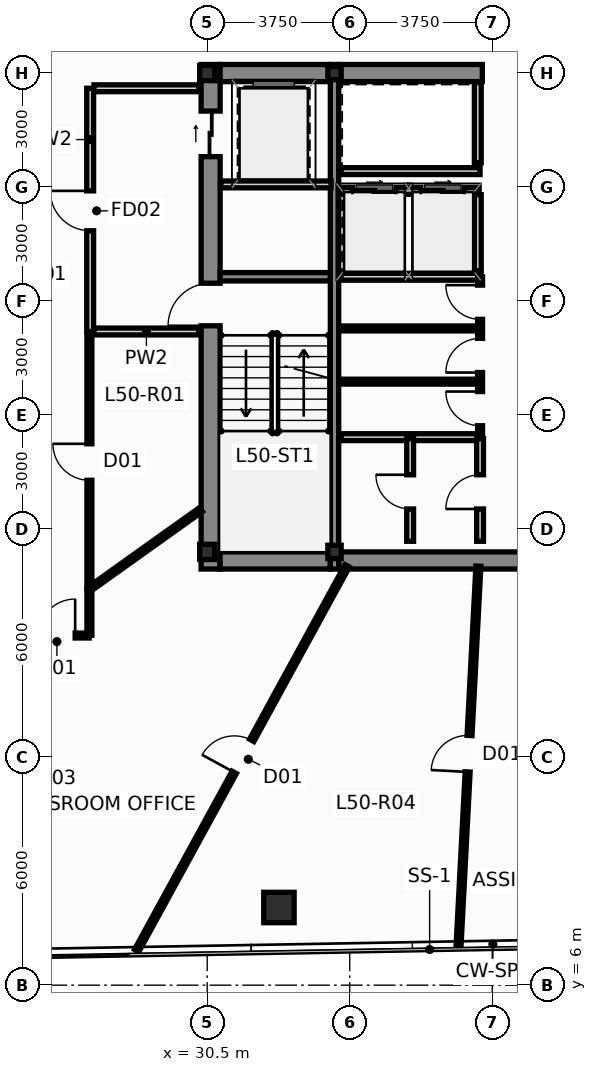
"""IFC4 building model, lengths in metres.
Left out: names, types, materials, properties, quantities, classifications, styles, units other than length and angle.
Written with IfcOpenShell. Run it as: python <this file> out.ifc"""

import sys

from ifc_helpers import new_model, si_unit, direction, frame, frame_2d, origin, origin_2d, place, context, subcontext, project, spatial, rectangle, hollow_rectangle, i_section, extrude, source, transform, mapped, element, fill, save


model = new_model("IFC4")
c1 = context("Model", 3, precision=1e-05, world=origin(), true_north=direction((0.0, 1.0)))
c2 = subcontext(c1, "Body", "Model", "MODEL_VIEW")
j1 = project(units=[si_unit("LENGTHUNIT", "METRE"), si_unit("PLANEANGLEUNIT", "RADIAN")], contexts=[c1])
p1 = place(None, origin())
s1 = spatial("IfcSite", under=j1, at=p1, CompositionType="ELEMENT")
p2 = place(p1, origin())
s2 = spatial("IfcBuilding", under=s1, at=p2, CompositionType="ELEMENT")
p3 = place(p2, frame((0.0, 0.0, 191.35)))
s3 = spatial("IfcBuildingStorey", under=s2, at=p3, CompositionType="ELEMENT", Elevation=191.35)
m1 = source(origin(), c2, "Body", "SweptSolid", [
    extrude(i_section(OverallWidth=0.4, OverallDepth=0.4, WebThickness=0.02, FlangeThickness=0.032, at=origin_2d()), origin(), (0.0, 0.0, 1.0), 3.65),
])
for number, where, z_axis, x_axis in (
    (1, (30.5, 17.4, 0.0), (0.0, 0.0, 1.0), (1.0, 0.0, 0.0)),
    (2, (30.5, 30.0, 0.0), (0.0, 0.0, 1.0), (1.0, 0.0, 0.0)),
):
    element("IfcColumn", number, at=place(p3, frame(where, z_axis=z_axis, x_axis=x_axis)), inside=s3, PredefinedType="COLUMN", context=c2, shape_type="MappedRepresentation", body=[
        mapped(m1, transform((0.0, 0.0, 0.0), scale=1.0)),
    ])
m2 = source(origin(), c2, "Body", "SweptSolid", [
    extrude(hollow_rectangle(XDim=0.35, YDim=0.35, WallThickness=0.016, at=origin_2d()), origin(), (0.0, 0.0, 1.0), 3.65),
])
for number, where, z_axis, x_axis in (
    (3, (33.85, 17.4, 0.0), (0.0, 0.0, 1.0), (1.0, 0.0, 0.0)),
    (4, (33.85, 30.0, 0.0), (0.0, 0.0, 1.0), (1.0, 0.0, 0.0)),
):
    element("IfcColumn", number, at=place(p3, frame(where, z_axis=z_axis, x_axis=x_axis)), inside=s3, PredefinedType="COLUMN", context=c2, shape_type="MappedRepresentation", body=[
        mapped(m2, transform((0.0, 0.0, 0.0), scale=1.0)),
    ])
p4 = place(p3, frame((30.59, 16.95, 0.0), z_axis=(0.0, 0.0, 1.0), x_axis=(0.0, 1.0, 0.0)))
e5 = element("IfcWall", 5, at=p4, inside=s3, PredefinedType="SHEAR", context=c2, shape_type="SweptSolid", body=[
    extrude(rectangle(XDim=13.275, YDim=0.5, at=frame_2d((6.638, 0.0))), origin(), (0.0, 0.0, 1.0), 3.65),
])
p5 = place(p4, frame((6.4, 0.0, 0.0)))
e6 = element("IfcOpeningElement", 6, at=p5, cuts=e5, PredefinedType="OPENING", context=c2, shape_type="SweptSolid", body=[
    extrude(rectangle(XDim=1.12, YDim=2.15, at=frame_2d((0.56, 1.075))), frame((0.0, 0.262, 0.0), z_axis=(0.0, -1.0, 0.0), x_axis=(1.0, 0.0, 0.0)), (0.0, 0.0, 1.0), 0.524),
])
p6 = place(p4, frame((10.85, 0.0, 0.0)))
e7 = element("IfcOpeningElement", 7, at=p6, cuts=e5, PredefinedType="OPENING", context=c2, shape_type="SweptSolid", body=[
    extrude(rectangle(XDim=1.2, YDim=2.2, at=frame_2d((0.6, 1.1))), frame((0.0, 0.262, 0.0), z_axis=(0.0, -1.0, 0.0), x_axis=(1.0, 0.0, 0.0)), (0.0, 0.0, 1.0), 0.524),
])
p7 = place(p3, frame((30.84, 17.175, 0.0), z_axis=(0.0, 0.0, 1.0), x_axis=(1.0, 0.0, 0.0)))
e8 = element("IfcWall", 8, at=p7, inside=s3, PredefinedType="SHEAR", context=c2, shape_type="SweptSolid", body=[
    extrude(rectangle(XDim=2.9, YDim=0.45, at=frame_2d((1.45, 0.0))), origin(), (0.0, 0.0, 1.0), 3.65),
])
p8 = place(p3, frame((33.96, 17.175, 0.0), z_axis=(0.0, 0.0, 1.0), x_axis=(1.0, 0.0, 0.0)))
e9 = element("IfcWall", 9, at=p8, inside=s3, PredefinedType="SHEAR", context=c2, shape_type="SweptSolid", body=[
    extrude(rectangle(XDim=8.08, YDim=0.45, at=frame_2d((4.04, 0.0))), origin(), (0.0, 0.0, 1.0), 3.65),
])
p9 = place(p3, frame((30.84, 30.0, 0.0), z_axis=(0.0, 0.0, 1.0), x_axis=(1.0, 0.0, 0.0)))
e10 = element("IfcWall", 10, at=p9, inside=s3, PredefinedType="SHEAR", context=c2, shape_type="SweptSolid", body=[
    extrude(rectangle(XDim=2.9, YDim=0.45, at=frame_2d((1.45, 0.0))), origin(), (0.0, 0.0, 1.0), 3.65),
])
p10 = place(p3, frame((33.96, 30.0, 0.0), z_axis=(0.0, 0.0, 1.0), x_axis=(1.0, 0.0, 0.0)))
e11 = element("IfcWall", 11, at=p10, inside=s3, PredefinedType="SHEAR", context=c2, shape_type="SweptSolid", body=[
    extrude(rectangle(XDim=3.78, YDim=0.45, at=frame_2d((1.89, 0.0))), origin(), (0.0, 0.0, 1.0), 3.65),
])
p11 = place(p3, frame((33.85, 16.95, 0.0), z_axis=(0.0, 0.0, 1.0), x_axis=(0.0, 1.0, 0.0)))
e12 = element("IfcWall", 12, at=p11, inside=s3, PredefinedType="SHEAR", context=c2, shape_type="SweptSolid", body=[
    extrude(rectangle(XDim=13.275, YDim=0.22, at=frame_2d((6.638, 0.0))), origin(), (0.0, 0.0, 1.0), 3.65),
])
p12 = place(p3, frame((30.84, 24.64, 0.0), z_axis=(0.0, 0.0, 1.0), x_axis=(1.0, 0.0, 0.0)))
e13 = element("IfcWall", 13, at=p12, inside=s3, PredefinedType="SHEAR", context=c2, shape_type="SweptSolid", body=[
    extrude(rectangle(XDim=2.9, YDim=0.22, at=frame_2d((1.45, 0.0))), origin(), (0.0, 0.0, 1.0), 3.65),
])
m3 = source(origin(), c2, "Body", "SweptSolid", [
    extrude(hollow_rectangle(XDim=0.8, YDim=0.8, WallThickness=0.045, at=origin_2d()), origin(), (0.0, 0.0, 1.0), 3.651),
])
p13 = place(p3, frame((32.387, 8.043, 0.0), z_axis=(-0.004480682206, 0.019795252729, 0.999794014513), x_axis=(-0.975326687046, -0.220766513622, 0.0)))
e14 = element("IfcColumn", 14, at=p13, inside=s3, PredefinedType="COLUMN", context=c2, shape_type="MappedRepresentation", body=[
    mapped(m3, transform((0.0, 0.0, 0.0), scale=1.0)),
])
p14 = place(p3, frame((34.02, 26.9, 0.0), z_axis=(0.0, 0.0, 1.0), x_axis=(1.0, 0.0, 0.0)))
e15 = element("IfcWall", 15, at=p14, inside=s3, PredefinedType="PARTITIONING", context=c2, shape_type="SweptSolid", body=[
    extrude(rectangle(XDim=3.6, YDim=0.18, at=frame_2d((1.8, 0.0))), origin(), (0.0, 0.0, 1.0), 3.4),
])
p15 = place(p14, frame((0.3, 0.0, 0.0)))
e16 = element("IfcOpeningElement", 16, at=p15, cuts=e15, PredefinedType="OPENING", context=c2, shape_type="SweptSolid", body=[
    extrude(rectangle(XDim=1.15, YDim=2.2, at=frame_2d((0.575, 1.1))), frame((0.0, 0.102, 0.0), z_axis=(0.0, -1.0, 0.0), x_axis=(1.0, 0.0, 0.0)), (0.0, 0.0, 1.0), 0.204),
])
p16 = place(p14, frame((2.1, 0.0, 0.0)))
e17 = element("IfcOpeningElement", 17, at=p16, cuts=e15, PredefinedType="OPENING", context=c2, shape_type="SweptSolid", body=[
    extrude(rectangle(XDim=1.15, YDim=2.2, at=frame_2d((0.575, 1.1))), frame((0.0, 0.102, 0.0), z_axis=(0.0, -1.0, 0.0), x_axis=(1.0, 0.0, 0.0)), (0.0, 0.0, 1.0), 0.204),
])
p17 = place(p3, frame((37.62, 24.8, 0.0), z_axis=(0.0, 0.0, 1.0), x_axis=(0.0, 1.0, 0.0)))
e18 = element("IfcWall", 18, at=p17, inside=s3, PredefinedType="PARTITIONING", context=c2, shape_type="SweptSolid", body=[
    extrude(rectangle(XDim=2.0, YDim=0.18, at=frame_2d((1.0, 0.0))), origin(), (0.0, 0.0, 1.0), 3.4),
])
p18 = place(p3, frame((34.02, 24.64, 0.0), z_axis=(0.0, 0.0, 1.0), x_axis=(1.0, 0.0, 0.0)))
e19 = element("IfcWall", 19, at=p18, inside=s3, PredefinedType="PARTITIONING", context=c2, shape_type="SweptSolid", body=[
    extrude(rectangle(XDim=3.68, YDim=0.18, at=frame_2d((1.84, 0.0))), origin(), (0.0, 0.0, 1.0), 3.4),
])
p19 = place(p3, frame((34.02, 27.42, 0.0), z_axis=(0.0, 0.0, 1.0), x_axis=(1.0, 0.0, 0.0)))
e20 = element("IfcWall", 20, at=p19, inside=s3, PredefinedType="PARTITIONING", context=c2, shape_type="SweptSolid", body=[
    extrude(rectangle(XDim=3.66, YDim=0.18, at=frame_2d((1.83, 0.0))), origin(), (0.0, 0.0, 1.0), 3.4),
])
p20 = place(p3, frame((37.62, 27.64, 0.0), z_axis=(0.0, 0.0, 1.0), x_axis=(0.0, 1.0, 0.0)))
e21 = element("IfcWall", 21, at=p20, inside=s3, PredefinedType="PARTITIONING", context=c2, shape_type="SweptSolid", body=[
    extrude(rectangle(XDim=2.11, YDim=0.18, at=frame_2d((1.055, 0.0))), origin(), (0.0, 0.0, 1.0), 3.4),
])
p21 = place(p3, frame((27.42, 23.2, 0.0), z_axis=(0.0, 0.0, 1.0), x_axis=(0.0, 1.0, 0.0)))
e22 = element("IfcWall", 22, at=p21, inside=s3, PredefinedType="PARTITIONING", context=c2, shape_type="SweptSolid", body=[
    extrude(rectangle(XDim=6.4, YDim=0.18, at=frame_2d((3.2, 0.0))), origin(), (0.0, 0.0, 1.0), 3.078),
])
p22 = place(p21, frame((2.65, 0.0, 0.0)))
e23 = element("IfcOpeningElement", 23, at=p22, cuts=e22, PredefinedType="OPENING", context=c2, shape_type="SweptSolid", body=[
    extrude(rectangle(XDim=1.05, YDim=2.15, at=frame_2d((0.525, 1.075))), frame((0.0, 0.102, 0.0), z_axis=(0.0, -1.0, 0.0), x_axis=(1.0, 0.0, 0.0)), (0.0, 0.0, 1.0), 0.204),
])
p23 = place(p3, frame((27.52, 23.2, 0.0), z_axis=(0.0, 0.0, 1.0), x_axis=(1.0, 0.0, 0.0)))
e24 = element("IfcWall", 24, at=p23, inside=s3, PredefinedType="PARTITIONING", context=c2, shape_type="SweptSolid", body=[
    extrude(rectangle(XDim=2.76, YDim=0.18, at=frame_2d((1.38, 0.0))), origin(), (0.0, 0.0, 1.0), 3.4),
])
p24 = place(p3, frame((27.52, 29.6, 0.0), z_axis=(0.0, 0.0, 1.0), x_axis=(1.0, 0.0, 0.0)))
e25 = element("IfcWall", 25, at=p24, inside=s3, PredefinedType="PARTITIONING", context=c2, shape_type="SweptSolid", body=[
    extrude(rectangle(XDim=2.76, YDim=0.18, at=frame_2d((1.38, 0.0))), origin(), (0.0, 0.0, 1.0), 2.925),
])
p25 = place(p3, frame((30.86, 27.07, 0.0), z_axis=(0.0, 0.0, 1.0), x_axis=(1.0, 0.0, 0.0)))
e26 = element("IfcWall", 26, at=p25, inside=s3, PredefinedType="PARTITIONING", context=c2, shape_type="SweptSolid", body=[
    extrude(rectangle(XDim=2.9, YDim=0.18, at=frame_2d((1.45, 0.0))), origin(), (0.0, 0.0, 1.0), 3.4),
])
p26 = place(p3, frame((34.02, 20.42, 0.0), z_axis=(0.0, 0.0, 1.0), x_axis=(1.0, 0.0, 0.0)))
e27 = element("IfcWall", 27, at=p26, inside=s3, PredefinedType="PARTITIONING", context=c2, shape_type="SweptSolid", body=[
    extrude(rectangle(XDim=3.64, YDim=0.18, at=frame_2d((1.82, 0.0))), origin(), (0.0, 0.0, 1.0), 3.4),
])
for number, where, z_axis, x_axis in (
    (28, (34.02, 21.88, 0.0), (0.0, 0.0, 1.0), (1.0, 0.0, 0.0)),
    (29, (34.02, 23.28, 0.0), (0.0, 0.0, 1.0), (1.0, 0.0, 0.0)),
):
    element("IfcWall", number, at=place(p3, frame(where, z_axis=z_axis, x_axis=x_axis)), inside=s3, PredefinedType="PARTITIONING", context=c2, shape_type="SweptSolid", body=[
        extrude(rectangle(XDim=3.58, YDim=0.13, at=frame_2d((1.79, 0.0))), origin(), (0.0, 0.0, 1.0), 3.4),
    ])
p27 = place(p3, frame((37.68, 20.5, 0.0), z_axis=(0.0, 0.0, 1.0), x_axis=(0.0, 1.0, 0.0)))
e30 = element("IfcWall", 30, at=p27, inside=s3, PredefinedType="PARTITIONING", context=c2, shape_type="SweptSolid", body=[
    extrude(rectangle(XDim=4.14, YDim=0.13, at=frame_2d((2.07, 0.0))), origin(), (0.0, 0.0, 1.0), 3.4),
])
p28 = place(p27, frame((0.22, 0.0, 0.0)))
e31 = element("IfcOpeningElement", 31, at=p28, cuts=e30, PredefinedType="OPENING", context=c2, shape_type="SweptSolid", body=[
    extrude(rectangle(XDim=0.9, YDim=2.1, at=frame_2d((0.45, 1.05))), frame((0.0, 0.077, 0.0), z_axis=(0.0, -1.0, 0.0), x_axis=(1.0, 0.0, 0.0)), (0.0, 0.0, 1.0), 0.154),
])
p29 = place(p27, frame((1.62, 0.0, 0.0)))
e32 = element("IfcOpeningElement", 32, at=p29, cuts=e30, PredefinedType="OPENING", context=c2, shape_type="SweptSolid", body=[
    extrude(rectangle(XDim=0.9, YDim=2.1, at=frame_2d((0.45, 1.05))), frame((0.0, 0.077, 0.0), z_axis=(0.0, -1.0, 0.0), x_axis=(1.0, 0.0, 0.0)), (0.0, 0.0, 1.0), 0.154),
])
p30 = place(p27, frame((3.02, 0.0, 0.0)))
e33 = element("IfcOpeningElement", 33, at=p30, cuts=e30, PredefinedType="OPENING", context=c2, shape_type="SweptSolid", body=[
    extrude(rectangle(XDim=0.9, YDim=2.1, at=frame_2d((0.45, 1.05))), frame((0.0, 0.077, 0.0), z_axis=(0.0, -1.0, 0.0), x_axis=(1.0, 0.0, 0.0)), (0.0, 0.0, 1.0), 0.154),
])
p31 = place(p3, frame((35.84, 17.68, 0.0), z_axis=(0.0, 0.0, 1.0), x_axis=(0.0, 1.0, 0.0)))
e34 = element("IfcWall", 34, at=p31, inside=s3, PredefinedType="PARTITIONING", context=c2, shape_type="SweptSolid", body=[
    extrude(rectangle(XDim=2.7, YDim=0.18, at=frame_2d((1.35, 0.0))), origin(), (0.0, 0.0, 1.0), 3.4),
])
p32 = place(p31, frame((0.85, 0.0, 0.0)))
e35 = element("IfcOpeningElement", 35, at=p32, cuts=e34, PredefinedType="OPENING", context=c2, shape_type="SweptSolid", body=[
    extrude(rectangle(XDim=0.9, YDim=2.1, at=frame_2d((0.45, 1.05))), frame((0.0, 0.102, 0.0), z_axis=(0.0, -1.0, 0.0), x_axis=(1.0, 0.0, 0.0)), (0.0, 0.0, 1.0), 0.204),
])
p33 = place(p3, frame((37.68, 17.68, 0.0), z_axis=(0.0, 0.0, 1.0), x_axis=(0.0, 1.0, 0.0)))
e36 = element("IfcWall", 36, at=p33, inside=s3, PredefinedType="PARTITIONING", context=c2, shape_type="SweptSolid", body=[
    extrude(rectangle(XDim=2.7, YDim=0.18, at=frame_2d((1.35, 0.0))), origin(), (0.0, 0.0, 1.0), 3.4),
])
p34 = place(p33, frame((0.85, 0.0, 0.0)))
e37 = element("IfcOpeningElement", 37, at=p34, cuts=e36, PredefinedType="OPENING", context=c2, shape_type="SweptSolid", body=[
    extrude(rectangle(XDim=0.9, YDim=2.1, at=frame_2d((0.45, 1.05))), frame((0.0, 0.102, 0.0), z_axis=(0.0, -1.0, 0.0), x_axis=(1.0, 0.0, 0.0)), (0.0, 0.0, 1.0), 0.204),
])
p35 = place(p3, frame((28.644, 6.909, 0.0), z_axis=(0.0, 0.0, 1.0), x_axis=(0.479998822193, 0.877269132418, 0.0)))
e38 = element("IfcWall", 38, at=p35, inside=s3, PredefinedType="PARTITIONING", context=c2, shape_type="SweptSolid", body=[
    extrude(rectangle(XDim=11.542, YDim=0.13, at=frame_2d((5.771, 0.0))), origin(), (0.0, 0.0, 1.0), 3.4),
])
p36 = place(p35, frame((5.347, 0.0, 0.0)))
e39 = element("IfcOpeningElement", 39, at=p36, cuts=e38, PredefinedType="OPENING", context=c2, shape_type="SweptSolid", body=[
    extrude(rectangle(XDim=0.96, YDim=2.15, at=frame_2d((0.48, 1.075))), frame((0.0, 0.077, 0.0), z_axis=(0.0, -1.0, 0.0), x_axis=(1.0, 0.0, 0.0)), (0.0, 0.0, 1.0), 0.154),
])
p37 = place(p3, frame((37.115, 7.059, 0.0), z_axis=(0.0, 0.0, 1.0), x_axis=(0.052204451421, 0.998636417948, 0.0)))
e40 = element("IfcWall", 40, at=p37, inside=s3, PredefinedType="PARTITIONING", context=c2, shape_type="SweptSolid", body=[
    extrude(rectangle(XDim=9.98, YDim=0.13, at=frame_2d((4.99, 0.0))), origin(), (0.0, 0.0, 1.0), 3.4),
])
p38 = place(p37, frame((4.559, 0.0, 0.0)))
e41 = element("IfcOpeningElement", 41, at=p38, cuts=e40, PredefinedType="OPENING", context=c2, shape_type="SweptSolid", body=[
    extrude(rectangle(XDim=0.96, YDim=2.15, at=frame_2d((0.48, 1.075))), frame((0.0, 0.077, 0.0), z_axis=(0.0, -1.0, 0.0), x_axis=(1.0, 0.0, 0.0)), (0.0, 0.0, 1.0), 0.154),
])
p39 = place(p3, frame((27.4, 16.425, 0.0), z_axis=(0.0, 0.0, 1.0), x_axis=(0.0, 1.0, 0.0)))
e42 = element("IfcWall", 42, at=p39, inside=s3, PredefinedType="PARTITIONING", context=c2, shape_type="SweptSolid", body=[
    extrude(rectangle(XDim=6.68, YDim=0.13, at=frame_2d((3.34, 0.0))), origin(), (0.0, 0.0, 1.0), 3.4),
])
p40 = place(p39, frame((2.86, 0.0, 0.0)))
e43 = element("IfcOpeningElement", 43, at=p40, cuts=e42, PredefinedType="OPENING", context=c2, shape_type="SweptSolid", body=[
    extrude(rectangle(XDim=0.96, YDim=2.15, at=frame_2d((0.48, 1.075))), frame((0.0, 0.077, 0.0), z_axis=(0.0, -1.0, 0.0), x_axis=(1.0, 0.0, 0.0)), (0.0, 0.0, 1.0), 0.154),
])
p41 = place(p3, frame((27.404, 16.423, 0.0), z_axis=(0.0, 0.0, 1.0), x_axis=(0.81418624732, 0.580603784585, 0.0)))
e44 = element("IfcWall", 44, at=p41, inside=s3, PredefinedType="PARTITIONING", context=c2, shape_type="SweptSolid", body=[
    extrude(rectangle(XDim=3.605, YDim=0.13, at=frame_2d((1.802, 0.0))), origin(), (0.0, 0.0, 1.0), 3.4),
])
p42 = place(p3, frame((25.695, 15.2, 0.0), z_axis=(0.0, 0.0, 1.0), x_axis=(1.0, 0.0, 0.0)))
e45 = element("IfcWall", 45, at=p42, inside=s3, PredefinedType="PARTITIONING", context=c2, shape_type="SweptSolid", body=[
    extrude(rectangle(XDim=1.7, YDim=0.13, at=frame_2d((0.85, 0.0))), origin(), (0.0, 0.0, 1.0), 3.4),
])
p43 = place(p42, frame((0.37, 0.0, 0.0)))
e46 = element("IfcOpeningElement", 46, at=p43, cuts=e45, PredefinedType="OPENING", context=c2, shape_type="SweptSolid", body=[
    extrude(rectangle(XDim=0.96, YDim=2.15, at=frame_2d((0.48, 1.075))), frame((0.0, 0.077, 0.0), z_axis=(0.0, -1.0, 0.0), x_axis=(1.0, 0.0, 0.0)), (0.0, 0.0, 1.0), 0.154),
])
p44 = place(p3, frame((27.4, 15.205, 0.0), z_axis=(0.0, 0.0, 1.0), x_axis=(0.0, 1.0, 0.0)))
e47 = element("IfcWall", 47, at=p44, inside=s3, PredefinedType="PARTITIONING", context=c2, shape_type="SweptSolid", body=[
    extrude(rectangle(XDim=1.21, YDim=0.13, at=frame_2d((0.605, 0.0))), origin(), (0.0, 0.0, 1.0), 3.4),
])
p45 = place(p5, origin())
e48 = element("IfcDoor", 48, at=p45, inside=s3, OperationType="SINGLE_SWING_LEFT", PredefinedType="DOOR", context=c2, shape_type="SweptSolid", body=[
    extrude(rectangle(XDim=1.12, YDim=2.15, at=frame_2d((0.56, 1.075))), frame((0.0, 0.025, 0.0), z_axis=(0.0, -1.0, 0.0), x_axis=(1.0, 0.0, 0.0)), (0.0, 0.0, 1.0), 0.05),
])
fill(e6, e48)
p46 = place(p6, origin())
e49 = element("IfcDoor", 49, at=p46, inside=s3, OperationType="SLIDING_TO_LEFT", PredefinedType="DOOR", context=c2, shape_type="SweptSolid", body=[
    extrude(rectangle(XDim=1.2, YDim=2.2, at=frame_2d((0.6, 1.1))), frame((0.0, 0.025, 0.0), z_axis=(0.0, -1.0, 0.0), x_axis=(1.0, 0.0, 0.0)), (0.0, 0.0, 1.0), 0.05),
])
fill(e7, e49)
p47 = place(p15, origin())
e50 = element("IfcDoor", 50, at=p47, inside=s3, OperationType="SLIDING_TO_LEFT", PredefinedType="DOOR", context=c2, shape_type="SweptSolid", body=[
    extrude(rectangle(XDim=1.15, YDim=2.2, at=frame_2d((0.575, 1.1))), frame((0.0, 0.025, 0.0), z_axis=(0.0, -1.0, 0.0), x_axis=(1.0, 0.0, 0.0)), (0.0, 0.0, 1.0), 0.05),
])
fill(e16, e50)
p48 = place(p16, origin())
e51 = element("IfcDoor", 51, at=p48, inside=s3, OperationType="SLIDING_TO_RIGHT", PredefinedType="DOOR", context=c2, shape_type="SweptSolid", body=[
    extrude(rectangle(XDim=1.15, YDim=2.2, at=frame_2d((0.575, 1.1))), frame((0.0, 0.025, 0.0), z_axis=(0.0, -1.0, 0.0), x_axis=(1.0, 0.0, 0.0)), (0.0, 0.0, 1.0), 0.05),
])
fill(e17, e51)
p49 = place(p22, origin())
e52 = element("IfcDoor", 52, at=p49, inside=s3, OperationType="SINGLE_SWING_RIGHT", PredefinedType="DOOR", context=c2, shape_type="SweptSolid", body=[
    extrude(rectangle(XDim=1.05, YDim=2.15, at=frame_2d((0.525, 1.075))), frame((0.0, 0.025, 0.0), z_axis=(0.0, -1.0, 0.0), x_axis=(1.0, 0.0, 0.0)), (0.0, 0.0, 1.0), 0.05),
])
fill(e23, e52)
p50 = place(p28, origin())
e53 = element("IfcDoor", 53, at=p50, inside=s3, OperationType="SINGLE_SWING_RIGHT", PredefinedType="DOOR", context=c2, shape_type="SweptSolid", body=[
    extrude(rectangle(XDim=0.9, YDim=2.1, at=frame_2d((0.45, 1.05))), frame((0.0, 0.025, 0.0), z_axis=(0.0, -1.0, 0.0), x_axis=(1.0, 0.0, 0.0)), (0.0, 0.0, 1.0), 0.05),
])
fill(e31, e53)
p51 = place(p29, origin())
e54 = element("IfcDoor", 54, at=p51, inside=s3, OperationType="SINGLE_SWING_LEFT", PredefinedType="DOOR", context=c2, shape_type="SweptSolid", body=[
    extrude(rectangle(XDim=0.9, YDim=2.1, at=frame_2d((0.45, 1.05))), frame((0.0, 0.025, 0.0), z_axis=(0.0, -1.0, 0.0), x_axis=(1.0, 0.0, 0.0)), (0.0, 0.0, 1.0), 0.05),
])
fill(e32, e54)
p52 = place(p30, origin())
e55 = element("IfcDoor", 55, at=p52, inside=s3, OperationType="SINGLE_SWING_RIGHT", PredefinedType="DOOR", context=c2, shape_type="SweptSolid", body=[
    extrude(rectangle(XDim=0.9, YDim=2.1, at=frame_2d((0.45, 1.05))), frame((0.0, 0.025, 0.0), z_axis=(0.0, -1.0, 0.0), x_axis=(1.0, 0.0, 0.0)), (0.0, 0.0, 1.0), 0.05),
])
fill(e33, e55)
p53 = place(p32, origin())
e56 = element("IfcDoor", 56, at=p53, inside=s3, OperationType="SINGLE_SWING_RIGHT", PredefinedType="DOOR", context=c2, shape_type="SweptSolid", body=[
    extrude(rectangle(XDim=0.9, YDim=2.1, at=frame_2d((0.45, 1.05))), frame((0.0, 0.025, 0.0), z_axis=(0.0, -1.0, 0.0), x_axis=(1.0, 0.0, 0.0)), (0.0, 0.0, 1.0), 0.05),
])
fill(e35, e56)
p54 = place(p34, origin())
e57 = element("IfcDoor", 57, at=p54, inside=s3, OperationType="SINGLE_SWING_LEFT", PredefinedType="DOOR", context=c2, shape_type="SweptSolid", body=[
    extrude(rectangle(XDim=0.9, YDim=2.1, at=frame_2d((0.45, 1.05))), frame((0.0, 0.025, 0.0), z_axis=(0.0, -1.0, 0.0), x_axis=(1.0, 0.0, 0.0)), (0.0, 0.0, 1.0), 0.05),
])
fill(e37, e57)
p55 = place(p36, origin())
e58 = element("IfcDoor", 58, at=p55, inside=s3, OperationType="SINGLE_SWING_LEFT", PredefinedType="DOOR", context=c2, shape_type="SweptSolid", body=[
    extrude(rectangle(XDim=0.96, YDim=2.15, at=frame_2d((0.48, 1.075))), frame((0.0, 0.025, 0.0), z_axis=(0.0, -1.0, 0.0), x_axis=(1.0, 0.0, 0.0)), (0.0, 0.0, 1.0), 0.05),
])
fill(e39, e58)
p56 = place(p38, origin())
e59 = element("IfcDoor", 59, at=p56, inside=s3, OperationType="SINGLE_SWING_LEFT", PredefinedType="DOOR", context=c2, shape_type="SweptSolid", body=[
    extrude(rectangle(XDim=0.96, YDim=2.15, at=frame_2d((0.48, 1.075))), frame((0.0, 0.025, 0.0), z_axis=(0.0, -1.0, 0.0), x_axis=(1.0, 0.0, 0.0)), (0.0, 0.0, 1.0), 0.05),
])
fill(e41, e59)
p57 = place(p40, origin())
e60 = element("IfcDoor", 60, at=p57, inside=s3, OperationType="SINGLE_SWING_RIGHT", PredefinedType="DOOR", context=c2, shape_type="SweptSolid", body=[
    extrude(rectangle(XDim=0.96, YDim=2.15, at=frame_2d((0.48, 1.075))), frame((0.0, 0.025, 0.0), z_axis=(0.0, -1.0, 0.0), x_axis=(1.0, 0.0, 0.0)), (0.0, 0.0, 1.0), 0.05),
])
fill(e43, e60)
p58 = place(p43, origin())
e61 = element("IfcDoor", 61, at=p58, inside=s3, OperationType="SINGLE_SWING_RIGHT", PredefinedType="DOOR", context=c2, shape_type="SweptSolid", body=[
    extrude(rectangle(XDim=0.96, YDim=2.15, at=frame_2d((0.48, 1.075))), frame((0.0, 0.025, 0.0), z_axis=(0.0, -1.0, 0.0), x_axis=(1.0, 0.0, 0.0)), (0.0, 0.0, 1.0), 0.05),
])
fill(e46, e61)
save(model, sys.argv[1])
